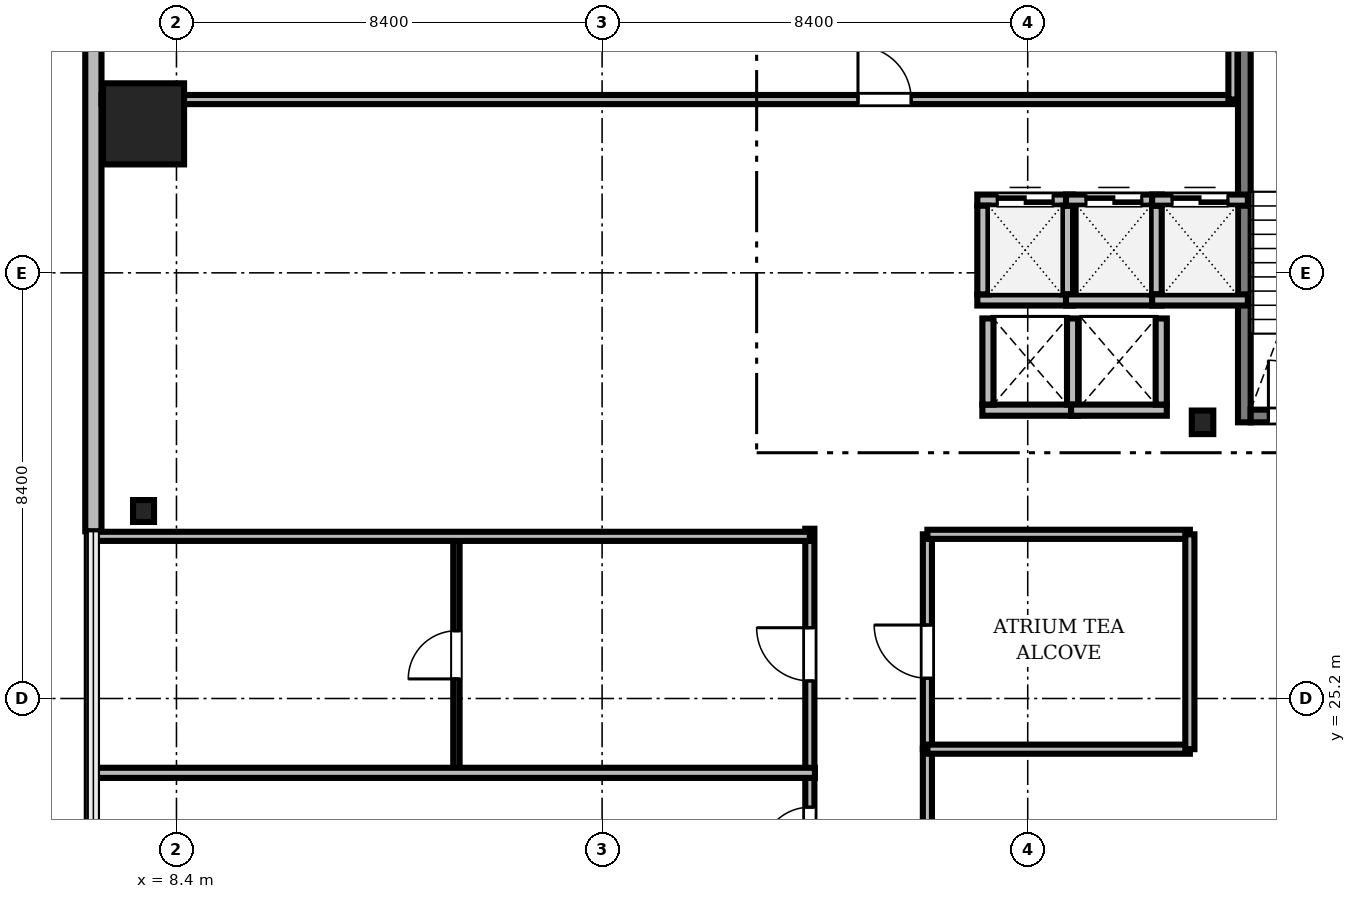
"""IFC4 building model, lengths in metres.
Left out: names, types, materials, properties, quantities, classifications, styles, units other than length and angle.
Written with IfcOpenShell. Run it as: python <this file> out.ifc"""

import sys

from ifc_helpers import new_model, si_unit, direction, frame, frame_2d, origin, origin_2d, place, context, subcontext, project, spatial, rectangle, i_section, extrude, source, transform, mapped, element, fill, save


model = new_model("IFC4")
c1 = context("Model", 3, precision=1e-05, world=origin(), true_north=direction((0.0, 1.0)))
c2 = subcontext(c1, "Body", "Model", "MODEL_VIEW")
j1 = project(units=[si_unit("LENGTHUNIT", "METRE"), si_unit("PLANEANGLEUNIT", "RADIAN")], contexts=[c1])
p1 = place(None, origin())
s1 = spatial("IfcSite", under=j1, at=p1, CompositionType="ELEMENT")
p2 = place(p1, origin())
s2 = spatial("IfcBuilding", under=s1, at=p2, CompositionType="ELEMENT")
p3 = place(p2, frame((0.0, 0.0, 137.2)))
s3 = spatial("IfcBuildingStorey", under=s2, at=p3, CompositionType="ELEMENT", Elevation=137.2)
m1 = source(origin(), c2, "Body", "SweptSolid", [
    extrude(i_section(OverallWidth=0.424, OverallDepth=0.465, WebThickness=0.035, FlangeThickness=0.056, FilletRadius=0.015, at=origin_2d()), origin(), (0.0, 0.0, 1.0), 3.46),
])
p4 = place(p3, frame((28.65, 30.65, 0.0), z_axis=(0.0, 0.0, 1.0), x_axis=(1.0, 0.0, 0.0)))
e1 = element("IfcColumn", 1, at=p4, inside=s3, PredefinedType="COLUMN", context=c2, shape_type="MappedRepresentation", body=[
    mapped(m1, transform((0.0, 0.0, 0.0), scale=1.0)),
])
m2 = source(origin(), c2, "Body", "SweptSolid", [
    extrude(rectangle(XDim=1.6, YDim=1.6, at=origin_2d()), origin(), (0.0, 0.0, 1.0), 3.46),
])
p5 = place(p3, frame((7.75, 36.54, 0.0), z_axis=(0.0, 0.0, 1.0), x_axis=(1.0, 0.0, 0.0)))
e2 = element("IfcColumn", 2, at=p5, inside=s3, PredefinedType="COLUMN", context=c2, shape_type="MappedRepresentation", body=[
    mapped(m2, transform((0.0, 0.0, 0.0), scale=1.0)),
])
m3 = source(origin(), c2, "Body", "SweptSolid", [
    extrude(i_section(OverallWidth=0.414, OverallDepth=0.432, WebThickness=0.026, FlangeThickness=0.04, FilletRadius=0.015, at=origin_2d()), origin(), (0.0, 0.0, 1.0), 3.46),
])
p6 = place(p3, frame((7.75, 28.9, 0.0), z_axis=(0.0, 0.0, 1.0), x_axis=(1.0, 0.0, 0.0)))
e3 = element("IfcColumn", 3, at=p6, inside=s3, PredefinedType="COLUMN", context=c2, shape_type="MappedRepresentation", body=[
    mapped(m3, transform((0.0, 0.0, 0.0), scale=1.0)),
])
m4 = source(origin(), c2, "Body", "SweptSolid", [
    extrude(rectangle(XDim=15.6, YDim=0.32, at=frame_2d((7.8, 0.0))), origin(), (0.0, 0.0, 1.0), 3.46),
])
p7 = place(p3, frame((6.76, 44.1, 0.0), z_axis=(0.0, 0.0, 1.0), x_axis=(0.0, -1.0, 0.0)))
e4 = element("IfcWall", 4, at=p7, inside=s3, PredefinedType="SOLIDWALL", context=c2, shape_type="MappedRepresentation", body=[
    mapped(m4, transform((0.0, 0.0, 0.0), scale=1.0)),
])
m5 = source(origin(), c2, "Body", "SweptSolid", [
    extrude(rectangle(XDim=2.2, YDim=2.4, at=frame_2d((1.1, 1.2))), frame((0.0, 0.17, 0.0), z_axis=(0.0, -1.0, 0.0), x_axis=(1.0, 0.0, 0.0)), (0.0, 0.0, 1.0), 0.34),
])
p8 = place(p7, frame((3.005, 0.0, 0.72)))
e5 = element("IfcOpeningElement", 5, at=p8, cuts=e4, PredefinedType="OPENING", context=c2, shape_type="MappedRepresentation", body=[
    mapped(m5, transform((0.0, 0.0, 0.0), scale=1.0)),
])
m6 = source(origin(), c2, "Body", "SweptSolid", [
    extrude(rectangle(XDim=9.25, YDim=0.25, at=frame_2d((4.625, 0.0))), origin(), (0.0, 0.0, 1.0), 3.5),
])
p9 = place(p3, frame((29.475, 30.65, 0.0), z_axis=(0.0, 0.0, 1.0), x_axis=(0.0, 1.0, 0.0)))
e6 = element("IfcWall", 6, at=p9, inside=s3, PredefinedType="SOLIDWALL", context=c2, shape_type="MappedRepresentation", body=[
    mapped(m6, transform((0.0, 0.0, 0.0), scale=1.0)),
])
m7 = source(origin(), c2, "Body", "SweptSolid", [
    extrude(rectangle(XDim=3.15, YDim=0.25, at=frame_2d((1.575, 0.0))), origin(), (0.0, 0.0, 1.0), 3.5),
])
p10 = place(p3, frame((29.6, 30.775, 0.0), z_axis=(0.0, 0.0, 1.0), x_axis=(1.0, 0.0, 0.0)))
e7 = element("IfcWall", 7, at=p10, inside=s3, PredefinedType="SOLIDWALL", context=c2, shape_type="MappedRepresentation", body=[
    mapped(m7, transform((0.0, 0.0, 0.0), scale=1.0)),
])
m8 = source(origin(), c2, "Body", "SweptSolid", [
    extrude(rectangle(XDim=1.1, YDim=2.2, at=frame_2d((0.55, 1.1))), frame((0.0, 0.135, 0.0), z_axis=(0.0, -1.0, 0.0), x_axis=(1.0, 0.0, 0.0)), (0.0, 0.0, 1.0), 0.27),
])
p11 = place(p10, frame((0.35, 0.0, 0.0)))
e8 = element("IfcOpeningElement", 8, at=p11, cuts=e7, PredefinedType="OPENING", context=c2, shape_type="MappedRepresentation", body=[
    mapped(m8, transform((0.0, 0.0, 0.0), scale=1.0)),
])
m9 = source(origin(), c2, "Body", "SweptSolid", [
    extrude(rectangle(XDim=1.89, YDim=0.22, at=frame_2d((0.945, 0.0))), origin(), (0.0, 0.0, 1.0), 3.46),
])
p12 = place(p3, frame((24.205, 33.065, 0.0), z_axis=(0.0, 0.0, 1.0), x_axis=(1.0, 0.0, 0.0)))
e9 = element("IfcWall", 9, at=p12, inside=s3, PredefinedType="SOLIDWALL", context=c2, shape_type="MappedRepresentation", body=[
    mapped(m9, transform((0.0, 0.0, 0.0), scale=1.0)),
])
p13 = place(p3, frame((24.205, 35.035, 0.0), z_axis=(0.0, 0.0, 1.0), x_axis=(1.0, 0.0, 0.0)))
e10 = element("IfcWall", 10, at=p13, inside=s3, PredefinedType="SOLIDWALL", context=c2, shape_type="MappedRepresentation", body=[
    mapped(m9, transform((0.0, 0.0, 0.0), scale=1.0)),
])
m10 = source(origin(), c2, "Body", "SweptSolid", [
    extrude(rectangle(XDim=1.1, YDim=2.2, at=frame_2d((0.55, 1.1))), frame((0.0, 0.12, 0.0), z_axis=(0.0, -1.0, 0.0), x_axis=(1.0, 0.0, 0.0)), (0.0, 0.0, 1.0), 0.24),
])
p14 = place(p13, frame((0.395, 0.0, 0.0)))
e11 = element("IfcOpeningElement", 11, at=p14, cuts=e10, PredefinedType="OPENING", context=c2, shape_type="MappedRepresentation", body=[
    mapped(m10, transform((0.0, 0.0, 0.0), scale=1.0)),
])
m11 = source(origin(), c2, "Body", "SweptSolid", [
    extrude(rectangle(XDim=1.75, YDim=0.22, at=frame_2d((0.875, 0.0))), origin(), (0.0, 0.0, 1.0), 3.46),
])
for number, where, z_axis, x_axis in (
    (12, (24.315, 33.175, 0.0), (0.0, 0.0, 1.0), (0.0, 1.0, 0.0)),
    (13, (25.985, 33.175, 0.0), (0.0, 0.0, 1.0), (0.0, 1.0, 0.0)),
):
    element("IfcWall", number, at=place(p3, frame(where, z_axis=z_axis, x_axis=x_axis)), inside=s3, PredefinedType="SOLIDWALL", context=c2, shape_type="MappedRepresentation", body=[
        mapped(m11, transform((0.0, 0.0, 0.0), scale=1.0)),
    ])
p15 = place(p3, frame((25.955, 33.065, 0.0), z_axis=(0.0, 0.0, 1.0), x_axis=(1.0, 0.0, 0.0)))
e14 = element("IfcWall", 14, at=p15, inside=s3, PredefinedType="SOLIDWALL", context=c2, shape_type="MappedRepresentation", body=[
    mapped(m9, transform((0.0, 0.0, 0.0), scale=1.0)),
])
p16 = place(p3, frame((25.955, 35.035, 0.0), z_axis=(0.0, 0.0, 1.0), x_axis=(1.0, 0.0, 0.0)))
e15 = element("IfcWall", 15, at=p16, inside=s3, PredefinedType="SOLIDWALL", context=c2, shape_type="MappedRepresentation", body=[
    mapped(m9, transform((0.0, 0.0, 0.0), scale=1.0)),
])
p17 = place(p16, frame((0.395, 0.0, 0.0)))
e16 = element("IfcOpeningElement", 16, at=p17, cuts=e15, PredefinedType="OPENING", context=c2, shape_type="MappedRepresentation", body=[
    mapped(m10, transform((0.0, 0.0, 0.0), scale=1.0)),
])
p18 = place(p3, frame((27.735, 33.175, 0.0), z_axis=(0.0, 0.0, 1.0), x_axis=(0.0, 1.0, 0.0)))
e17 = element("IfcWall", 17, at=p18, inside=s3, PredefinedType="SOLIDWALL", context=c2, shape_type="MappedRepresentation", body=[
    mapped(m11, transform((0.0, 0.0, 0.0), scale=1.0)),
])
p19 = place(p3, frame((27.655, 33.065, 0.0), z_axis=(0.0, 0.0, 1.0), x_axis=(1.0, 0.0, 0.0)))
e18 = element("IfcWall", 18, at=p19, inside=s3, PredefinedType="SOLIDWALL", context=c2, shape_type="MappedRepresentation", body=[
    mapped(m9, transform((0.0, 0.0, 0.0), scale=1.0)),
])
p20 = place(p3, frame((27.655, 35.035, 0.0), z_axis=(0.0, 0.0, 1.0), x_axis=(1.0, 0.0, 0.0)))
e19 = element("IfcWall", 19, at=p20, inside=s3, PredefinedType="SOLIDWALL", context=c2, shape_type="MappedRepresentation", body=[
    mapped(m9, transform((0.0, 0.0, 0.0), scale=1.0)),
])
p21 = place(p20, frame((0.395, 0.0, 0.0)))
e20 = element("IfcOpeningElement", 20, at=p21, cuts=e19, PredefinedType="OPENING", context=c2, shape_type="MappedRepresentation", body=[
    mapped(m10, transform((0.0, 0.0, 0.0), scale=1.0)),
])
m12 = source(origin(), c2, "Body", "SweptSolid", [
    extrude(rectangle(XDim=1.89, YDim=0.22, at=frame_2d((0.945, 0.0))), origin(), (0.0, 0.0, 1.0), 3.46),
])
p22 = place(p3, frame((24.305, 30.89, 0.0), z_axis=(0.0, 0.0, 1.0), x_axis=(1.0, 0.0, 0.0)))
e21 = element("IfcWall", 21, at=p22, inside=s3, PredefinedType="SOLIDWALL", context=c2, shape_type="MappedRepresentation", body=[
    mapped(m12, transform((0.0, 0.0, 0.0), scale=1.0)),
])
m13 = source(origin(), c2, "Body", "SweptSolid", [
    extrude(rectangle(XDim=1.7, YDim=0.22, at=frame_2d((0.85, 0.0))), origin(), (0.0, 0.0, 1.0), 3.46),
])
for number, where, z_axis, x_axis in (
    (22, (24.415, 31.0, 0.0), (0.0, 0.0, 1.0), (0.0, 1.0, 0.0)),
    (23, (26.085, 31.0, 0.0), (0.0, 0.0, 1.0), (0.0, 1.0, 0.0)),
):
    element("IfcWall", number, at=place(p3, frame(where, z_axis=z_axis, x_axis=x_axis)), inside=s3, PredefinedType="SOLIDWALL", context=c2, shape_type="MappedRepresentation", body=[
        mapped(m13, transform((0.0, 0.0, 0.0), scale=1.0)),
    ])
p23 = place(p3, frame((26.055, 30.89, 0.0), z_axis=(0.0, 0.0, 1.0), x_axis=(1.0, 0.0, 0.0)))
e24 = element("IfcWall", 24, at=p23, inside=s3, PredefinedType="SOLIDWALL", context=c2, shape_type="MappedRepresentation", body=[
    mapped(m12, transform((0.0, 0.0, 0.0), scale=1.0)),
])
p24 = place(p3, frame((27.835, 31.0, 0.0), z_axis=(0.0, 0.0, 1.0), x_axis=(0.0, 1.0, 0.0)))
e25 = element("IfcWall", 25, at=p24, inside=s3, PredefinedType="SOLIDWALL", context=c2, shape_type="MappedRepresentation", body=[
    mapped(m13, transform((0.0, 0.0, 0.0), scale=1.0)),
])
m14 = source(origin(), c2, "Body", "SweptSolid", [
    extrude(rectangle(XDim=22.328, YDim=0.18, at=frame_2d((11.164, 0.0))), origin(), (0.0, 0.0, 1.0), 2.702),
])
p25 = place(p3, frame((6.922, 37.02, 0.0), z_axis=(0.0, 0.0, 1.0), x_axis=(1.0, 0.0, 0.0)))
e26 = element("IfcWall", 26, at=p25, inside=s3, PredefinedType="PARTITIONING", context=c2, shape_type="MappedRepresentation", body=[
    mapped(m14, transform((0.0, 0.0, 0.0), scale=1.0)),
])
m15 = source(origin(), c2, "Body", "SweptSolid", [
    extrude(rectangle(XDim=1.05, YDim=2.2, at=frame_2d((0.525, 1.1))), frame((0.0, 0.1, 0.0), z_axis=(0.0, -1.0, 0.0), x_axis=(1.0, 0.0, 0.0)), (0.0, 0.0, 1.0), 0.2),
])
p26 = place(p25, frame((14.928, 0.0, 0.0)))
e27 = element("IfcOpeningElement", 27, at=p26, cuts=e26, PredefinedType="OPENING", context=c2, shape_type="MappedRepresentation", body=[
    mapped(m15, transform((0.0, 0.0, 0.0), scale=1.0)),
])
m16 = source(origin(), c2, "Body", "SweptSolid", [
    extrude(rectangle(XDim=14.15, YDim=0.18, at=frame_2d((7.075, 0.0))), origin(), (0.0, 0.0, 1.0), 2.852),
])
p27 = place(p3, frame((20.9, 14.4, 0.0), z_axis=(0.0, 0.0, 1.0), x_axis=(0.0, 1.0, 0.0)))
e28 = element("IfcWall", 28, at=p27, inside=s3, PredefinedType="PARTITIONING", context=c2, shape_type="MappedRepresentation", body=[
    mapped(m16, transform((0.0, 0.0, 0.0), scale=1.0)),
])
p28 = place(p27, frame((1.813, 0.0, 0.0)))
e29 = element("IfcOpeningElement", 29, at=p28, cuts=e28, PredefinedType="OPENING", context=c2, shape_type="MappedRepresentation", body=[
    mapped(m15, transform((0.0, 0.0, 0.0), scale=1.0)),
])
m17 = source(origin(), c2, "Body", "SweptSolid", [
    extrude(rectangle(XDim=0.95, YDim=2.15, at=frame_2d((0.475, 1.075))), frame((0.0, 0.1, 0.0), z_axis=(0.0, -1.0, 0.0), x_axis=(1.0, 0.0, 0.0)), (0.0, 0.0, 1.0), 0.2),
])
p29 = place(p27, frame((7.705, 0.0, 0.0)))
e30 = element("IfcOpeningElement", 30, at=p29, cuts=e28, PredefinedType="OPENING", context=c2, shape_type="MappedRepresentation", body=[
    mapped(m17, transform((0.0, 0.0, 0.0), scale=1.0)),
])
p30 = place(p27, frame((11.146, 0.0, 0.0)))
e31 = element("IfcOpeningElement", 31, at=p30, cuts=e28, PredefinedType="OPENING", context=c2, shape_type="MappedRepresentation", body=[
    mapped(m15, transform((0.0, 0.0, 0.0), scale=1.0)),
])
m18 = source(origin(), c2, "Body", "SweptSolid", [
    extrude(rectangle(XDim=4.667, YDim=0.125, at=frame_2d((2.333, 0.0))), origin(), (0.0, 0.0, 1.0), 2.852),
])
p31 = place(p3, frame((13.925, 23.733, 0.0), z_axis=(0.0, 0.0, 1.0), x_axis=(0.0, 1.0, 0.0)))
e32 = element("IfcWall", 32, at=p31, inside=s3, PredefinedType="PARTITIONING", context=c2, shape_type="MappedRepresentation", body=[
    mapped(m18, transform((0.0, 0.0, 0.0), scale=1.0)),
])
m19 = source(origin(), c2, "Body", "SweptSolid", [
    extrude(rectangle(XDim=0.95, YDim=2.15, at=frame_2d((0.475, 1.075))), frame((0.0, 0.073, 0.0), z_axis=(0.0, -1.0, 0.0), x_axis=(1.0, 0.0, 0.0)), (0.0, 0.0, 1.0), 0.145),
])
p32 = place(p31, frame((1.853, 0.0, 0.0)))
e33 = element("IfcOpeningElement", 33, at=p32, cuts=e32, PredefinedType="OPENING", context=c2, shape_type="MappedRepresentation", body=[
    mapped(m19, transform((0.0, 0.0, 0.0), scale=1.0)),
])
m20 = source(origin(), c2, "Body", "SweptSolid", [
    extrude(rectangle(XDim=4.24, YDim=0.18, at=frame_2d((2.12, 0.0))), origin(), (0.0, 0.0, 1.0), 2.852),
])
p33 = place(p3, frame((23.22, 24.2, 0.0), z_axis=(0.0, 0.0, 1.0), x_axis=(0.0, 1.0, 0.0)))
e34 = element("IfcWall", 34, at=p33, inside=s3, PredefinedType="PARTITIONING", context=c2, shape_type="MappedRepresentation", body=[
    mapped(m20, transform((0.0, 0.0, 0.0), scale=1.0)),
])
p34 = place(p33, frame((1.4, 0.0, 0.0)))
e35 = element("IfcOpeningElement", 35, at=p34, cuts=e34, PredefinedType="OPENING", context=c2, shape_type="MappedRepresentation", body=[
    mapped(m15, transform((0.0, 0.0, 0.0), scale=1.0)),
])
m21 = source(origin(), c2, "Body", "SweptSolid", [
    extrude(rectangle(XDim=4.15, YDim=0.18, at=frame_2d((2.075, 0.0))), origin(), (0.0, 0.0, 1.0), 3.122),
])
p35 = place(p3, frame((23.22, 20.05, 0.0), z_axis=(0.0, 0.0, 1.0), x_axis=(0.0, 1.0, 0.0)))
e36 = element("IfcWall", 36, at=p35, inside=s3, PredefinedType="PARTITIONING", context=c2, shape_type="MappedRepresentation", body=[
    mapped(m21, transform((0.0, 0.0, 0.0), scale=1.0)),
])
p36 = place(p35, frame((1.4, 0.0, 0.0)))
e37 = element("IfcOpeningElement", 37, at=p36, cuts=e36, PredefinedType="OPENING", context=c2, shape_type="MappedRepresentation", body=[
    mapped(m15, transform((0.0, 0.0, 0.0), scale=1.0)),
])
m22 = source(origin(), c2, "Body", "SweptSolid", [
    extrude(rectangle(XDim=14.27, YDim=0.2, at=frame_2d((7.135, 0.0))), origin(), (0.0, 0.0, 1.0), 2.702),
])
p37 = place(p3, frame((6.73, 23.733, 0.0), z_axis=(0.0, 0.0, 1.0), x_axis=(1.0, 0.0, 0.0)))
e38 = element("IfcWall", 38, at=p37, inside=s3, PredefinedType="PARTITIONING", context=c2, shape_type="MappedRepresentation", body=[
    mapped(m22, transform((0.0, 0.0, 0.0), scale=1.0)),
])
m23 = source(origin(), c2, "Body", "SweptSolid", [
    extrude(rectangle(XDim=14.17, YDim=0.18, at=frame_2d((7.085, 0.0))), origin(), (0.0, 0.0, 1.0), 2.702),
])
p38 = place(p3, frame((6.73, 28.4, 0.0), z_axis=(0.0, 0.0, 1.0), x_axis=(1.0, 0.0, 0.0)))
e39 = element("IfcWall", 39, at=p38, inside=s3, PredefinedType="PARTITIONING", context=c2, shape_type="MappedRepresentation", body=[
    mapped(m23, transform((0.0, 0.0, 0.0), scale=1.0)),
])
m24 = source(origin(), c2, "Body", "SweptSolid", [
    extrude(rectangle(XDim=11.45, YDim=0.18, at=frame_2d((5.725, 0.0))), origin(), (0.0, 0.0, 1.0), 2.702),
])
p39 = place(p3, frame((29.25, 37.02, 0.0), z_axis=(0.0, 0.0, 1.0), x_axis=(0.0, 1.0, 0.0)))
e40 = element("IfcWall", 40, at=p39, inside=s3, PredefinedType="PARTITIONING", context=c2, shape_type="MappedRepresentation", body=[
    mapped(m24, transform((0.0, 0.0, 0.0), scale=1.0)),
])
m25 = source(origin(), c2, "Body", "SweptSolid", [
    extrude(rectangle(XDim=5.18, YDim=0.18, at=frame_2d((2.59, 0.0))), origin(), (0.0, 0.0, 1.0), 3.46),
])
for number, where, z_axis, x_axis in (
    (41, (23.22, 24.2, 0.0), (0.0, 0.0, 1.0), (1.0, 0.0, 0.0)),
    (42, (23.22, 28.44, 0.0), (0.0, 0.0, 1.0), (1.0, 0.0, 0.0)),
):
    element("IfcWall", number, at=place(p3, frame(where, z_axis=z_axis, x_axis=x_axis)), inside=s3, PredefinedType="PARTITIONING", context=c2, shape_type="MappedRepresentation", body=[
        mapped(m25, transform((0.0, 0.0, 0.0), scale=1.0)),
    ])
p40 = place(p3, frame((28.4, 24.2, 0.0), z_axis=(0.0, 0.0, 1.0), x_axis=(0.0, 1.0, 0.0)))
e43 = element("IfcWall", 43, at=p40, inside=s3, PredefinedType="PARTITIONING", context=c2, shape_type="MappedRepresentation", body=[
    mapped(m20, transform((0.0, 0.0, 0.0), scale=1.0)),
])
m26 = source(origin(), c2, "Body", "SweptSolid", [
    extrude(rectangle(XDim=1.1, YDim=2.2, at=frame_2d((0.55, 1.1))), frame((0.0, 0.025, 0.0), z_axis=(0.0, -1.0, 0.0), x_axis=(1.0, 0.0, 0.0)), (0.0, 0.0, 1.0), 0.05),
])
p41 = place(p11, origin())
e44 = element("IfcDoor", 44, at=p41, inside=s3, OperationType="SINGLE_SWING_LEFT", PredefinedType="DOOR", context=c2, shape_type="MappedRepresentation", body=[
    mapped(m26, transform((0.0, 0.0, 0.0), scale=1.0)),
])
fill(e8, e44)
p42 = place(p14, origin())
e45 = element("IfcDoor", 45, at=p42, inside=s3, OperationType="DOUBLE_DOOR_SLIDING", PredefinedType="DOOR", context=c2, shape_type="MappedRepresentation", body=[
    mapped(m26, transform((0.0, 0.0, 0.0), scale=1.0)),
])
fill(e11, e45)
p43 = place(p17, origin())
e46 = element("IfcDoor", 46, at=p43, inside=s3, OperationType="DOUBLE_DOOR_SLIDING", PredefinedType="DOOR", context=c2, shape_type="MappedRepresentation", body=[
    mapped(m26, transform((0.0, 0.0, 0.0), scale=1.0)),
])
fill(e16, e46)
p44 = place(p21, origin())
e47 = element("IfcDoor", 47, at=p44, inside=s3, OperationType="DOUBLE_DOOR_SLIDING", PredefinedType="DOOR", context=c2, shape_type="MappedRepresentation", body=[
    mapped(m26, transform((0.0, 0.0, 0.0), scale=1.0)),
])
fill(e20, e47)
m27 = source(origin(), c2, "Body", "SweptSolid", [
    extrude(rectangle(XDim=1.05, YDim=2.2, at=frame_2d((0.525, 1.1))), frame((0.0, 0.025, 0.0), z_axis=(0.0, -1.0, 0.0), x_axis=(1.0, 0.0, 0.0)), (0.0, 0.0, 1.0), 0.05),
])
p45 = place(p26, origin())
e48 = element("IfcDoor", 48, at=p45, inside=s3, OperationType="SINGLE_SWING_LEFT", PredefinedType="DOOR", context=c2, shape_type="MappedRepresentation", body=[
    mapped(m27, transform((0.0, 0.0, 0.0), scale=1.0)),
])
fill(e27, e48)
m28 = source(origin(), c2, "Body", "SweptSolid", [
    extrude(rectangle(XDim=0.95, YDim=2.15, at=frame_2d((0.475, 1.075))), frame((0.0, 0.025, 0.0), z_axis=(0.0, -1.0, 0.0), x_axis=(1.0, 0.0, 0.0)), (0.0, 0.0, 1.0), 0.05),
])
p46 = place(p29, origin())
e49 = element("IfcDoor", 49, at=p46, inside=s3, OperationType="SINGLE_SWING_LEFT", PredefinedType="DOOR", context=c2, shape_type="MappedRepresentation", body=[
    mapped(m28, transform((0.0, 0.0, 0.0), scale=1.0)),
])
fill(e30, e49)
p47 = place(p30, origin())
e50 = element("IfcDoor", 50, at=p47, inside=s3, OperationType="SINGLE_SWING_RIGHT", PredefinedType="DOOR", context=c2, shape_type="MappedRepresentation", body=[
    mapped(m27, transform((0.0, 0.0, 0.0), scale=1.0)),
])
fill(e31, e50)
p48 = place(p32, origin())
e51 = element("IfcDoor", 51, at=p48, inside=s3, OperationType="SINGLE_SWING_LEFT", PredefinedType="DOOR", context=c2, shape_type="MappedRepresentation", body=[
    mapped(m28, transform((0.0, 0.0, 0.0), scale=1.0)),
])
fill(e33, e51)
p49 = place(p34, origin())
e52 = element("IfcDoor", 52, at=p49, inside=s3, OperationType="SINGLE_SWING_RIGHT", PredefinedType="DOOR", context=c2, shape_type="MappedRepresentation", body=[
    mapped(m27, transform((0.0, 0.0, 0.0), scale=1.0)),
])
fill(e35, e52)
save(model, sys.argv[1])
